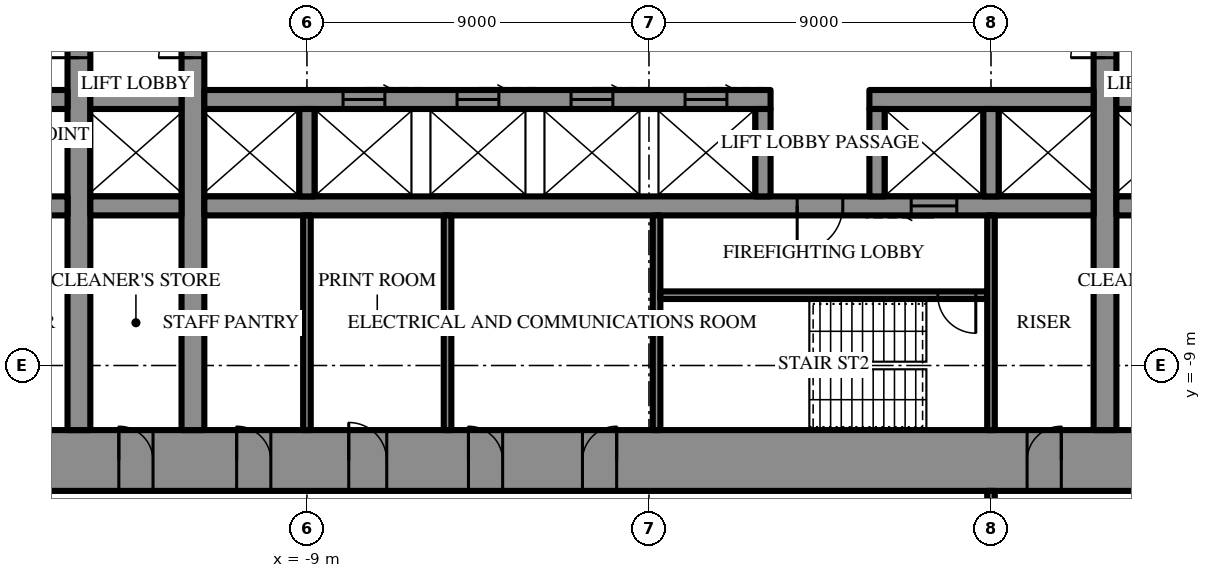
"""IFC4 building model, lengths in metres.
Left out: names, types, materials, properties, quantities, classifications, styles, units other than length and angle.
Written with IfcOpenShell. Run it as: python <this file> out.ifc"""

import sys

from ifc_helpers import new_model, si_unit, direction, frame, frame_2d, origin, place, context, subcontext, project, spatial, rectangle, extrude, element, fill, save


model = new_model("IFC4")
c1 = context("Model", 3, precision=1e-05, world=origin(), true_north=direction((0.0, 1.0)))
c2 = subcontext(c1, "Body", "Model", "MODEL_VIEW")
j1 = project(units=[si_unit("LENGTHUNIT", "METRE"), si_unit("PLANEANGLEUNIT", "RADIAN")], contexts=[c1])
p1 = place(None, origin())
s1 = spatial("IfcSite", under=j1, at=p1, CompositionType="ELEMENT")
p2 = place(p1, origin())
s2 = spatial("IfcBuilding", under=s1, at=p2, CompositionType="ELEMENT")
p3 = place(p2, frame((0.0, 0.0, 169.9)))
s3 = spatial("IfcBuildingStorey", under=s2, at=p3, CompositionType="ELEMENT", Elevation=169.9)
p4 = place(p3, frame((18.6, -11.5, 0.0), z_axis=(0.0, 0.0, 1.0), x_axis=(-1.0, 0.0, 0.0)))
e1 = element("IfcWall", 1, at=p4, inside=s3, PredefinedType="SHEAR", context=c2, shape_type="SweptSolid", body=[
    extrude(rectangle(XDim=37.2, YDim=1.6, at=frame_2d((18.6, 0.0))), origin(), (0.0, 0.0, 1.0), 4.2),
])
p5 = place(p4, frame((19.45, 0.0, 0.0)))
e2 = element("IfcOpeningElement", 2, at=p5, cuts=e1, PredefinedType="OPENING", context=c2, shape_type="SweptSolid", body=[
    extrude(rectangle(XDim=0.9, YDim=2.2, at=frame_2d((0.45, 1.1))), frame((0.0, 0.81, 0.0), z_axis=(0.0, -1.0, 0.0), x_axis=(1.0, 0.0, 0.0)), (0.0, 0.0, 1.0), 1.62),
])
p6 = place(p4, frame((22.45, 0.0, 0.0)))
e3 = element("IfcOpeningElement", 3, at=p6, cuts=e1, PredefinedType="OPENING", context=c2, shape_type="SweptSolid", body=[
    extrude(rectangle(XDim=0.9, YDim=2.2, at=frame_2d((0.45, 1.1))), frame((0.0, 0.81, 0.0), z_axis=(0.0, -1.0, 0.0), x_axis=(1.0, 0.0, 0.0)), (0.0, 0.0, 1.0), 1.62),
])
p7 = place(p4, frame((25.5, 0.0, 0.0)))
e4 = element("IfcOpeningElement", 4, at=p7, cuts=e1, PredefinedType="OPENING", context=c2, shape_type="SweptSolid", body=[
    extrude(rectangle(XDim=1.0, YDim=2.2, at=frame_2d((0.5, 1.1))), frame((0.0, 0.81, 0.0), z_axis=(0.0, -1.0, 0.0), x_axis=(1.0, 0.0, 0.0)), (0.0, 0.0, 1.0), 1.62),
])
p8 = place(p4, frame((1.8, 0.0, 0.0)))
e5 = element("IfcOpeningElement", 5, at=p8, cuts=e1, PredefinedType="OPENING", context=c2, shape_type="SweptSolid", body=[
    extrude(rectangle(XDim=0.9, YDim=2.2, at=frame_2d((0.45, 1.1))), frame((0.0, 0.81, 0.0), z_axis=(0.0, -1.0, 0.0), x_axis=(1.0, 0.0, 0.0)), (0.0, 0.0, 1.0), 1.62),
])
p9 = place(p4, frame((4.65, 0.0, 0.0)))
e6 = element("IfcOpeningElement", 6, at=p9, cuts=e1, PredefinedType="OPENING", context=c2, shape_type="SweptSolid", body=[
    extrude(rectangle(XDim=0.9, YDim=2.2, at=frame_2d((0.45, 1.1))), frame((0.0, 0.81, 0.0), z_axis=(0.0, -1.0, 0.0), x_axis=(1.0, 0.0, 0.0)), (0.0, 0.0, 1.0), 1.62),
])
p10 = place(p4, frame((7.75, 0.0, 0.0)))
e7 = element("IfcOpeningElement", 7, at=p10, cuts=e1, PredefinedType="OPENING", context=c2, shape_type="SweptSolid", body=[
    extrude(rectangle(XDim=0.9, YDim=2.2, at=frame_2d((0.45, 1.1))), frame((0.0, 0.81, 0.0), z_axis=(0.0, -1.0, 0.0), x_axis=(1.0, 0.0, 0.0)), (0.0, 0.0, 1.0), 1.62),
])
p11 = place(p4, frame((28.55, 0.0, 0.0)))
e8 = element("IfcOpeningElement", 8, at=p11, cuts=e1, PredefinedType="OPENING", context=c2, shape_type="SweptSolid", body=[
    extrude(rectangle(XDim=0.9, YDim=2.2, at=frame_2d((0.45, 1.1))), frame((0.0, 0.81, 0.0), z_axis=(0.0, -1.0, 0.0), x_axis=(1.0, 0.0, 0.0)), (0.0, 0.0, 1.0), 1.62),
])
p12 = place(p4, frame((31.65, 0.0, 0.0)))
e9 = element("IfcOpeningElement", 9, at=p12, cuts=e1, PredefinedType="OPENING", context=c2, shape_type="SweptSolid", body=[
    extrude(rectangle(XDim=0.9, YDim=2.2, at=frame_2d((0.45, 1.1))), frame((0.0, 0.81, 0.0), z_axis=(0.0, -1.0, 0.0), x_axis=(1.0, 0.0, 0.0)), (0.0, 0.0, 1.0), 1.62),
])
p13 = place(p4, frame((34.5, 0.0, 0.0)))
e10 = element("IfcOpeningElement", 10, at=p13, cuts=e1, PredefinedType="OPENING", context=c2, shape_type="SweptSolid", body=[
    extrude(rectangle(XDim=0.9, YDim=2.2, at=frame_2d((0.45, 1.1))), frame((0.0, 0.81, 0.0), z_axis=(0.0, -1.0, 0.0), x_axis=(1.0, 0.0, 0.0)), (0.0, 0.0, 1.0), 1.62),
])
p14 = place(p3, frame((12.0, -10.7, 0.0), z_axis=(0.0, 0.0, 1.0), x_axis=(0.0, 1.0, 0.0)))
e11 = element("IfcWall", 11, at=p14, inside=s3, PredefinedType="SHEAR", context=c2, shape_type="SweptSolid", body=[
    extrude(rectangle(XDim=21.4, YDim=0.6, at=frame_2d((10.7, 0.0))), origin(), (0.0, 0.0, 1.0), 4.2),
])
p15 = place(p14, frame((9.8, 0.0, 0.0)))
e12 = element("IfcOpeningElement", 12, at=p15, cuts=e11, PredefinedType="OPENING", context=c2, shape_type="SweptSolid", body=[
    extrude(rectangle(XDim=1.8, YDim=2.4, at=frame_2d((0.9, 1.2))), frame((0.0, 0.31, 0.0), z_axis=(0.0, -1.0, 0.0), x_axis=(1.0, 0.0, 0.0)), (0.0, 0.0, 1.0), 0.62),
])
p16 = place(p3, frame((-12.0, -10.7, 0.0), z_axis=(0.0, 0.0, 1.0), x_axis=(0.0, 1.0, 0.0)))
e13 = element("IfcWall", 13, at=p16, inside=s3, PredefinedType="SHEAR", context=c2, shape_type="SweptSolid", body=[
    extrude(rectangle(XDim=21.4, YDim=0.6, at=frame_2d((10.7, 0.0))), origin(), (0.0, 0.0, 1.0), 4.2),
])
p17 = place(p16, frame((9.8, 0.0, 0.0)))
e14 = element("IfcOpeningElement", 14, at=p17, cuts=e13, PredefinedType="OPENING", context=c2, shape_type="SweptSolid", body=[
    extrude(rectangle(XDim=1.8, YDim=2.4, at=frame_2d((0.9, 1.2))), frame((0.0, 0.31, 0.0), z_axis=(0.0, -1.0, 0.0), x_axis=(1.0, 0.0, 0.0)), (0.0, 0.0, 1.0), 0.62),
])
p18 = place(p3, frame((-15.0, -10.7, 0.0), z_axis=(0.0, 0.0, 1.0), x_axis=(0.0, 1.0, 0.0)))
e15 = element("IfcWall", 15, at=p18, inside=s3, PredefinedType="SHEAR", context=c2, shape_type="SweptSolid", body=[
    extrude(rectangle(XDim=21.4, YDim=0.6, at=frame_2d((10.7, 0.0))), origin(), (0.0, 0.0, 1.0), 4.2),
])
p19 = place(p18, frame((9.8, 0.0, 0.0)))
e16 = element("IfcOpeningElement", 16, at=p19, cuts=e15, PredefinedType="OPENING", context=c2, shape_type="SweptSolid", body=[
    extrude(rectangle(XDim=1.8, YDim=2.4, at=frame_2d((0.9, 1.2))), frame((0.0, 0.31, 0.0), z_axis=(0.0, -1.0, 0.0), x_axis=(1.0, 0.0, 0.0)), (0.0, 0.0, 1.0), 0.62),
])
p20 = place(p3, frame((14.7, -2.0, 0.0), z_axis=(0.0, 0.0, 1.0), x_axis=(-1.0, 0.0, 0.0)))
e17 = element("IfcWall", 17, at=p20, inside=s3, PredefinedType="SHEAR", context=c2, shape_type="SweptSolid", body=[
    extrude(rectangle(XDim=2.4, YDim=0.5, at=frame_2d((1.2, 0.0))), origin(), (0.0, 0.0, 1.0), 4.2),
])
p21 = place(p3, frame((11.7, -2.0, 0.0), z_axis=(0.0, 0.0, 1.0), x_axis=(-1.0, 0.0, 0.0)))
e18 = element("IfcWall", 18, at=p21, inside=s3, PredefinedType="SHEAR", context=c2, shape_type="SweptSolid", body=[
    extrude(rectangle(XDim=5.9, YDim=0.5, at=frame_2d((2.95, 0.0))), origin(), (0.0, 0.0, 1.0), 4.2),
])
p22 = place(p3, frame((3.2, -2.0, 0.0), z_axis=(0.0, 0.0, 1.0), x_axis=(-1.0, 0.0, 0.0)))
e19 = element("IfcWall", 19, at=p22, inside=s3, PredefinedType="SHEAR", context=c2, shape_type="SweptSolid", body=[
    extrude(rectangle(XDim=14.9, YDim=0.5, at=frame_2d((7.45, 0.0))), origin(), (0.0, 0.0, 1.0), 4.2),
])
p23 = place(p22, frame((1.15, 0.0, 0.0)))
e20 = element("IfcOpeningElement", 20, at=p23, cuts=e19, PredefinedType="OPENING", context=c2, shape_type="SweptSolid", body=[
    extrude(rectangle(XDim=1.1, YDim=2.2, at=frame_2d((0.55, 1.1))), frame((0.0, 0.26, 0.0), z_axis=(0.0, -1.0, 0.0), x_axis=(1.0, 0.0, 0.0)), (0.0, 0.0, 1.0), 0.52),
])
p24 = place(p22, frame((4.15, 0.0, 0.0)))
e21 = element("IfcOpeningElement", 21, at=p24, cuts=e19, PredefinedType="OPENING", context=c2, shape_type="SweptSolid", body=[
    extrude(rectangle(XDim=1.1, YDim=2.2, at=frame_2d((0.55, 1.1))), frame((0.0, 0.26, 0.0), z_axis=(0.0, -1.0, 0.0), x_axis=(1.0, 0.0, 0.0)), (0.0, 0.0, 1.0), 0.52),
])
p25 = place(p22, frame((7.15, 0.0, 0.0)))
e22 = element("IfcOpeningElement", 22, at=p25, cuts=e19, PredefinedType="OPENING", context=c2, shape_type="SweptSolid", body=[
    extrude(rectangle(XDim=1.1, YDim=2.2, at=frame_2d((0.55, 1.1))), frame((0.0, 0.26, 0.0), z_axis=(0.0, -1.0, 0.0), x_axis=(1.0, 0.0, 0.0)), (0.0, 0.0, 1.0), 0.52),
])
p26 = place(p22, frame((10.15, 0.0, 0.0)))
e23 = element("IfcOpeningElement", 23, at=p26, cuts=e19, PredefinedType="OPENING", context=c2, shape_type="SweptSolid", body=[
    extrude(rectangle(XDim=1.1, YDim=2.2, at=frame_2d((0.55, 1.1))), frame((0.0, 0.26, 0.0), z_axis=(0.0, -1.0, 0.0), x_axis=(1.0, 0.0, 0.0)), (0.0, 0.0, 1.0), 0.52),
])
p27 = place(p3, frame((-12.3, -2.0, 0.0), z_axis=(0.0, 0.0, 1.0), x_axis=(-1.0, 0.0, 0.0)))
e24 = element("IfcWall", 24, at=p27, inside=s3, PredefinedType="SHEAR", context=c2, shape_type="SweptSolid", body=[
    extrude(rectangle(XDim=2.4, YDim=0.5, at=frame_2d((1.2, 0.0))), origin(), (0.0, 0.0, 1.0), 4.2),
])
p28 = place(p3, frame((-15.3, -2.0, 0.0), z_axis=(0.0, 0.0, 1.0), x_axis=(-1.0, 0.0, 0.0)))
e25 = element("IfcWall", 25, at=p28, inside=s3, PredefinedType="SHEAR", context=c2, shape_type="SweptSolid", body=[
    extrude(rectangle(XDim=2.1, YDim=0.5, at=frame_2d((1.05, 0.0))), origin(), (0.0, 0.0, 1.0), 4.2),
])
p29 = place(p28, frame((0.6, 0.0, 0.0)))
e26 = element("IfcOpeningElement", 26, at=p29, cuts=e25, PredefinedType="OPENING", context=c2, shape_type="SweptSolid", body=[
    extrude(rectangle(XDim=0.9, YDim=2.2, at=frame_2d((0.45, 1.1))), frame((0.0, 0.26, 0.0), z_axis=(0.0, -1.0, 0.0), x_axis=(1.0, 0.0, 0.0)), (0.0, 0.0, 1.0), 0.52),
])
p30 = place(p3, frame((14.7, -4.8, 0.0), z_axis=(0.0, 0.0, 1.0), x_axis=(-1.0, 0.0, 0.0)))
e27 = element("IfcWall", 27, at=p30, inside=s3, PredefinedType="SHEAR", context=c2, shape_type="SweptSolid", body=[
    extrude(rectangle(XDim=2.4, YDim=0.5, at=frame_2d((1.2, 0.0))), origin(), (0.0, 0.0, 1.0), 4.2),
])
p31 = place(p3, frame((11.7, -4.8, 0.0), z_axis=(0.0, 0.0, 1.0), x_axis=(-1.0, 0.0, 0.0)))
e28 = element("IfcWall", 28, at=p31, inside=s3, PredefinedType="SHEAR", context=c2, shape_type="SweptSolid", body=[
    extrude(rectangle(XDim=23.4, YDim=0.5, at=frame_2d((11.7, 0.0))), origin(), (0.0, 0.0, 1.0), 4.2),
])
p32 = place(p31, frame((6.6, 0.0, 0.0)))
e29 = element("IfcOpeningElement", 29, at=p32, cuts=e28, PredefinedType="OPENING", context=c2, shape_type="SweptSolid", body=[
    extrude(rectangle(XDim=1.2, YDim=2.2, at=frame_2d((0.6, 1.1))), frame((0.0, 0.26, 0.0), z_axis=(0.0, -1.0, 0.0), x_axis=(1.0, 0.0, 0.0)), (0.0, 0.0, 1.0), 0.52),
])
p33 = place(p31, frame((3.6, 0.0, 0.0)))
e30 = element("IfcOpeningElement", 30, at=p33, cuts=e28, PredefinedType="OPENING", context=c2, shape_type="SweptSolid", body=[
    extrude(rectangle(XDim=1.2, YDim=2.2, at=frame_2d((0.6, 1.1))), frame((0.0, 0.26, 0.0), z_axis=(0.0, -1.0, 0.0), x_axis=(1.0, 0.0, 0.0)), (0.0, 0.0, 1.0), 0.52),
])
p34 = place(p3, frame((-12.3, -4.8, 0.0), z_axis=(0.0, 0.0, 1.0), x_axis=(-1.0, 0.0, 0.0)))
e31 = element("IfcWall", 31, at=p34, inside=s3, PredefinedType="SHEAR", context=c2, shape_type="SweptSolid", body=[
    extrude(rectangle(XDim=2.4, YDim=0.5, at=frame_2d((1.2, 0.0))), origin(), (0.0, 0.0, 1.0), 4.2),
])
p35 = place(p3, frame((-15.3, -4.8, 0.0), z_axis=(0.0, 0.0, 1.0), x_axis=(-1.0, 0.0, 0.0)))
e32 = element("IfcWall", 32, at=p35, inside=s3, PredefinedType="SHEAR", context=c2, shape_type="SweptSolid", body=[
    extrude(rectangle(XDim=2.1, YDim=0.5, at=frame_2d((1.05, 0.0))), origin(), (0.0, 0.0, 1.0), 4.2),
])
for number, where, z_axis, x_axis in (
    (33, (9.0, -2.25, 0.0), (0.0, 0.0, 1.0), (0.0, -1.0, 0.0)),
    (34, (6.0, -2.25, 0.0), (0.0, 0.0, 1.0), (0.0, -1.0, 0.0)),
    (35, (3.0, -2.25, 0.0), (0.0, 0.0, 1.0), (0.0, -1.0, 0.0)),
    (36, (-9.0, -2.25, 0.0), (0.0, 0.0, 1.0), (0.0, -1.0, 0.0)),
):
    element("IfcWall", number, at=place(p3, frame(where, z_axis=z_axis, x_axis=x_axis)), inside=s3, PredefinedType="SHEAR", context=c2, shape_type="SweptSolid", body=[
        extrude(rectangle(XDim=2.3, YDim=0.4, at=frame_2d((1.15, 0.0))), origin(), (0.0, 0.0, 1.0), 4.2),
    ])
p36 = place(p3, frame((0.2, -5.05, 0.0), z_axis=(0.0, 0.0, 1.0), x_axis=(0.0, -1.0, 0.0)))
e37 = element("IfcWall", 37, at=p36, inside=s3, PredefinedType="SHEAR", context=c2, shape_type="SweptSolid", body=[
    extrude(rectangle(XDim=5.65, YDim=0.2, at=frame_2d((2.825, 0.0))), origin(), (0.0, 0.0, 1.0), 4.2),
])
p37 = place(p3, frame((8.9, -7.15, 0.0), z_axis=(0.0, 0.0, 1.0), x_axis=(-1.0, 0.0, 0.0)))
e38 = element("IfcWall", 38, at=p37, inside=s3, PredefinedType="SHEAR", context=c2, shape_type="SweptSolid", body=[
    extrude(rectangle(XDim=8.6, YDim=0.2, at=frame_2d((4.3, 0.0))), origin(), (0.0, 0.0, 1.0), 4.2),
])
p38 = place(p37, frame((0.3, 0.0, 0.0)))
e39 = element("IfcOpeningElement", 39, at=p38, cuts=e38, PredefinedType="OPENING", context=c2, shape_type="SweptSolid", body=[
    extrude(rectangle(XDim=1.0, YDim=2.2, at=frame_2d((0.5, 1.1))), frame((0.0, 0.11, 0.0), z_axis=(0.0, -1.0, 0.0), x_axis=(1.0, 0.0, 0.0)), (0.0, 0.0, 1.0), 0.22),
])
for number, where, z_axis, x_axis in (
    (40, (9.0, -5.05, 0.0), (0.0, 0.0, 1.0), (0.0, -1.0, 0.0)),
    (41, (-9.0, -5.05, 0.0), (0.0, 0.0, 1.0), (0.0, -1.0, 0.0)),
    (42, (-5.3, -5.05, 0.0), (0.0, 0.0, 1.0), (0.0, -1.0, 0.0)),
):
    element("IfcWall", number, at=place(p3, frame(where, z_axis=z_axis, x_axis=x_axis)), inside=s3, PredefinedType="PARTITIONING", context=c2, shape_type="SweptSolid", body=[
        extrude(rectangle(XDim=5.65, YDim=0.2, at=frame_2d((2.825, 0.0))), origin(), (0.0, 0.0, 1.0), 4.0),
    ])
p39 = place(p3, frame((9.0, -12.3, 0.0), z_axis=(0.0, 0.0, 1.0), x_axis=(0.0, -1.0, 0.0)))
e43 = element("IfcWall", 43, at=p39, inside=s3, PredefinedType="PARTITIONING", context=c2, shape_type="SweptSolid", body=[
    extrude(rectangle(XDim=19.0, YDim=0.2, at=frame_2d((9.5, 0.0))), origin(), (0.0, 0.0, 1.0), 4.0),
])
p40 = place(p39, frame((1.4, 0.0, 0.0)))
e44 = element("IfcOpeningElement", 44, at=p40, cuts=e43, PredefinedType="OPENING", context=c2, shape_type="SweptSolid", body=[
    extrude(rectangle(XDim=1.0, YDim=2.2, at=frame_2d((0.5, 1.1))), frame((0.0, 0.11, 0.0), z_axis=(0.0, -1.0, 0.0), x_axis=(1.0, 0.0, 0.0)), (0.0, 0.0, 1.0), 0.22),
])
p41 = place(p32, origin())
e45 = element("IfcDoor", 45, at=p41, inside=s3, OperationType="SINGLE_SWING_LEFT", PredefinedType="DOOR", context=c2, shape_type="SweptSolid", body=[
    extrude(rectangle(XDim=1.2, YDim=2.2, at=frame_2d((0.6, 1.1))), frame((0.0, 0.025, 0.0), z_axis=(0.0, -1.0, 0.0), x_axis=(1.0, 0.0, 0.0)), (0.0, 0.0, 1.0), 0.05),
])
fill(e29, e45)
p42 = place(p38, origin())
e46 = element("IfcDoor", 46, at=p42, inside=s3, OperationType="SINGLE_SWING_RIGHT", PredefinedType="DOOR", context=c2, shape_type="SweptSolid", body=[
    extrude(rectangle(XDim=1.0, YDim=2.2, at=frame_2d((0.5, 1.1))), frame((0.0, 0.025, 0.0), z_axis=(0.0, -1.0, 0.0), x_axis=(1.0, 0.0, 0.0)), (0.0, 0.0, 1.0), 0.05),
])
fill(e39, e46)
p43 = place(p5, frame((0.9, 0.0, 0.0), z_axis=(0.0, 0.0, 1.0), x_axis=(-1.0, 0.0, 0.0)))
e47 = element("IfcDoor", 47, at=p43, inside=s3, OperationType="SINGLE_SWING_LEFT", PredefinedType="DOOR", context=c2, shape_type="SweptSolid", body=[
    extrude(rectangle(XDim=0.9, YDim=2.2, at=frame_2d((0.45, 1.1))), frame((0.0, 0.025, 0.0), z_axis=(0.0, -1.0, 0.0), x_axis=(1.0, 0.0, 0.0)), (0.0, 0.0, 1.0), 0.05),
])
fill(e2, e47)
p44 = place(p6, frame((0.9, 0.0, 0.0), z_axis=(0.0, 0.0, 1.0), x_axis=(-1.0, 0.0, 0.0)))
e48 = element("IfcDoor", 48, at=p44, inside=s3, OperationType="SINGLE_SWING_RIGHT", PredefinedType="DOOR", context=c2, shape_type="SweptSolid", body=[
    extrude(rectangle(XDim=0.9, YDim=2.2, at=frame_2d((0.45, 1.1))), frame((0.0, 0.025, 0.0), z_axis=(0.0, -1.0, 0.0), x_axis=(1.0, 0.0, 0.0)), (0.0, 0.0, 1.0), 0.05),
])
fill(e3, e48)
p45 = place(p7, frame((1.0, 0.0, 0.0), z_axis=(0.0, 0.0, 1.0), x_axis=(-1.0, 0.0, 0.0)))
e49 = element("IfcDoor", 49, at=p45, inside=s3, OperationType="SINGLE_SWING_RIGHT", PredefinedType="DOOR", context=c2, shape_type="SweptSolid", body=[
    extrude(rectangle(XDim=1.0, YDim=2.2, at=frame_2d((0.5, 1.1))), frame((0.0, 0.025, 0.0), z_axis=(0.0, -1.0, 0.0), x_axis=(1.0, 0.0, 0.0)), (0.0, 0.0, 1.0), 0.05),
])
fill(e4, e49)
p46 = place(p10, frame((0.9, 0.0, 0.0), z_axis=(0.0, 0.0, 1.0), x_axis=(-1.0, 0.0, 0.0)))
e50 = element("IfcDoor", 50, at=p46, inside=s3, OperationType="SINGLE_SWING_LEFT", PredefinedType="DOOR", context=c2, shape_type="SweptSolid", body=[
    extrude(rectangle(XDim=0.9, YDim=2.2, at=frame_2d((0.45, 1.1))), frame((0.0, 0.025, 0.0), z_axis=(0.0, -1.0, 0.0), x_axis=(1.0, 0.0, 0.0)), (0.0, 0.0, 1.0), 0.05),
])
fill(e7, e50)
p47 = place(p11, frame((0.9, 0.0, 0.0), z_axis=(0.0, 0.0, 1.0), x_axis=(-1.0, 0.0, 0.0)))
e51 = element("IfcDoor", 51, at=p47, inside=s3, OperationType="SINGLE_SWING_RIGHT", PredefinedType="DOOR", context=c2, shape_type="SweptSolid", body=[
    extrude(rectangle(XDim=0.9, YDim=2.2, at=frame_2d((0.45, 1.1))), frame((0.0, 0.025, 0.0), z_axis=(0.0, -1.0, 0.0), x_axis=(1.0, 0.0, 0.0)), (0.0, 0.0, 1.0), 0.05),
])
fill(e8, e51)
p48 = place(p12, frame((0.9, 0.0, 0.0), z_axis=(0.0, 0.0, 1.0), x_axis=(-1.0, 0.0, 0.0)))
e52 = element("IfcDoor", 52, at=p48, inside=s3, OperationType="SINGLE_SWING_RIGHT", PredefinedType="DOOR", context=c2, shape_type="SweptSolid", body=[
    extrude(rectangle(XDim=0.9, YDim=2.2, at=frame_2d((0.45, 1.1))), frame((0.0, 0.025, 0.0), z_axis=(0.0, -1.0, 0.0), x_axis=(1.0, 0.0, 0.0)), (0.0, 0.0, 1.0), 0.05),
])
fill(e9, e52)
p49 = place(p15, origin())
e53 = element("IfcDoor", 53, at=p49, inside=s3, OperationType="DOUBLE_DOOR_SINGLE_SWING", PredefinedType="DOOR", context=c2, shape_type="SweptSolid", body=[
    extrude(rectangle(XDim=1.8, YDim=2.4, at=frame_2d((0.9, 1.2))), frame((0.0, 0.025, 0.0), z_axis=(0.0, -1.0, 0.0), x_axis=(1.0, 0.0, 0.0)), (0.0, 0.0, 1.0), 0.05),
])
fill(e12, e53)
p50 = place(p17, origin())
e54 = element("IfcDoor", 54, at=p50, inside=s3, OperationType="DOUBLE_DOOR_SINGLE_SWING", PredefinedType="DOOR", context=c2, shape_type="SweptSolid", body=[
    extrude(rectangle(XDim=1.8, YDim=2.4, at=frame_2d((0.9, 1.2))), frame((0.0, 0.025, 0.0), z_axis=(0.0, -1.0, 0.0), x_axis=(1.0, 0.0, 0.0)), (0.0, 0.0, 1.0), 0.05),
])
fill(e14, e54)
p51 = place(p19, origin())
e55 = element("IfcDoor", 55, at=p51, inside=s3, OperationType="DOUBLE_DOOR_SINGLE_SWING", PredefinedType="DOOR", context=c2, shape_type="SweptSolid", body=[
    extrude(rectangle(XDim=1.8, YDim=2.4, at=frame_2d((0.9, 1.2))), frame((0.0, 0.025, 0.0), z_axis=(0.0, -1.0, 0.0), x_axis=(1.0, 0.0, 0.0)), (0.0, 0.0, 1.0), 0.05),
])
fill(e16, e55)
p52 = place(p33, origin())
e56 = element("IfcDoor", 56, at=p52, inside=s3, OperationType="SLIDING_TO_LEFT", PredefinedType="DOOR", context=c2, shape_type="SweptSolid", body=[
    extrude(rectangle(XDim=1.2, YDim=2.2, at=frame_2d((0.6, 1.1))), frame((0.0, 0.025, 0.0), z_axis=(0.0, -1.0, 0.0), x_axis=(1.0, 0.0, 0.0)), (0.0, 0.0, 1.0), 0.05),
])
fill(e30, e56)
p53 = place(p23, frame((1.1, 0.0, 0.0), z_axis=(0.0, 0.0, 1.0), x_axis=(-1.0, 0.0, 0.0)))
e57 = element("IfcDoor", 57, at=p53, inside=s3, OperationType="SLIDING_TO_LEFT", PredefinedType="DOOR", context=c2, shape_type="SweptSolid", body=[
    extrude(rectangle(XDim=1.1, YDim=2.2, at=frame_2d((0.55, 1.1))), frame((0.0, 0.025, 0.0), z_axis=(0.0, -1.0, 0.0), x_axis=(1.0, 0.0, 0.0)), (0.0, 0.0, 1.0), 0.05),
])
fill(e20, e57)
p54 = place(p24, frame((1.1, 0.0, 0.0), z_axis=(0.0, 0.0, 1.0), x_axis=(-1.0, 0.0, 0.0)))
e58 = element("IfcDoor", 58, at=p54, inside=s3, OperationType="SLIDING_TO_LEFT", PredefinedType="DOOR", context=c2, shape_type="SweptSolid", body=[
    extrude(rectangle(XDim=1.1, YDim=2.2, at=frame_2d((0.55, 1.1))), frame((0.0, 0.025, 0.0), z_axis=(0.0, -1.0, 0.0), x_axis=(1.0, 0.0, 0.0)), (0.0, 0.0, 1.0), 0.05),
])
fill(e21, e58)
p55 = place(p25, frame((1.1, 0.0, 0.0), z_axis=(0.0, 0.0, 1.0), x_axis=(-1.0, 0.0, 0.0)))
e59 = element("IfcDoor", 59, at=p55, inside=s3, OperationType="SLIDING_TO_LEFT", PredefinedType="DOOR", context=c2, shape_type="SweptSolid", body=[
    extrude(rectangle(XDim=1.1, YDim=2.2, at=frame_2d((0.55, 1.1))), frame((0.0, 0.025, 0.0), z_axis=(0.0, -1.0, 0.0), x_axis=(1.0, 0.0, 0.0)), (0.0, 0.0, 1.0), 0.05),
])
fill(e22, e59)
p56 = place(p26, frame((1.1, 0.0, 0.0), z_axis=(0.0, 0.0, 1.0), x_axis=(-1.0, 0.0, 0.0)))
e60 = element("IfcDoor", 60, at=p56, inside=s3, OperationType="SLIDING_TO_LEFT", PredefinedType="DOOR", context=c2, shape_type="SweptSolid", body=[
    extrude(rectangle(XDim=1.1, YDim=2.2, at=frame_2d((0.55, 1.1))), frame((0.0, 0.025, 0.0), z_axis=(0.0, -1.0, 0.0), x_axis=(1.0, 0.0, 0.0)), (0.0, 0.0, 1.0), 0.05),
])
fill(e23, e60)
save(model, sys.argv[1])
